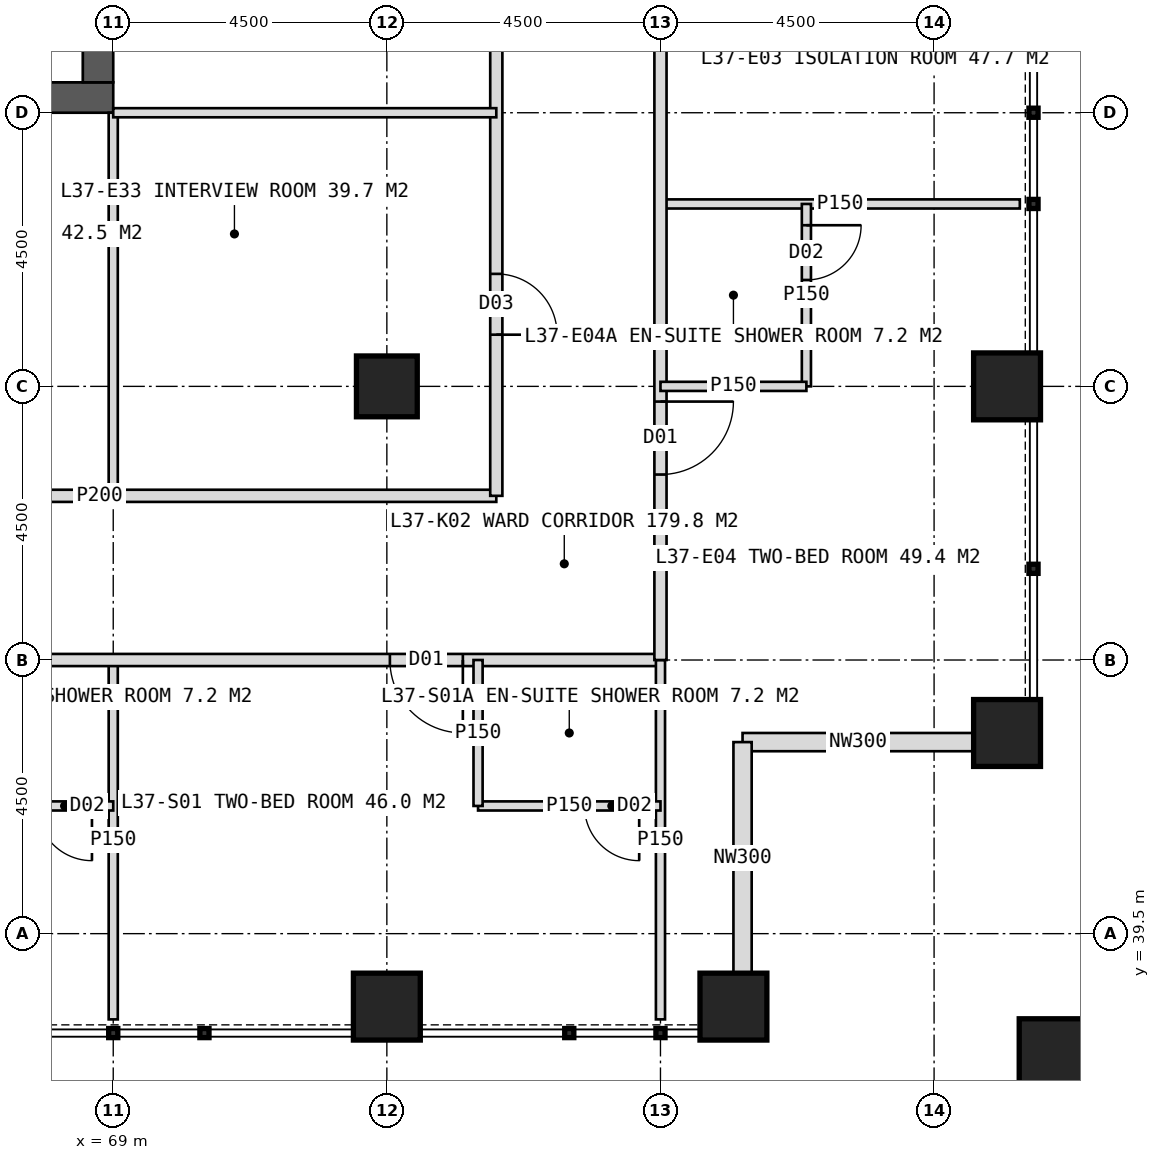
"""IFC4 building model, lengths in metres.
Left out: names, types, materials, properties, quantities, classifications, styles, units other than length and angle.
Written with IfcOpenShell. Run it as: python <this file> out.ifc"""

import sys

from ifc_helpers import new_model, si_unit, direction, frame, frame_2d, origin, origin_2d, place, context, subcontext, project, spatial, rectangle, hollow_rectangle, extrude, element, fill, save


model = new_model("IFC4")
c1 = context("Model", 3, precision=1e-05, world=origin(), true_north=direction((0.0, 1.0)))
c2 = subcontext(c1, "Body", "Model", "MODEL_VIEW")
j1 = project(units=[si_unit("LENGTHUNIT", "METRE"), si_unit("PLANEANGLEUNIT", "RADIAN")], contexts=[c1])
p1 = place(None, origin())
s1 = spatial("IfcSite", under=j1, at=p1, CompositionType="ELEMENT")
p2 = place(p1, origin())
s2 = spatial("IfcBuilding", under=s1, at=p2, CompositionType="ELEMENT")
p3 = place(p2, frame((0.0, 0.0, 156.0)))
s3 = spatial("IfcBuildingStorey", under=s2, at=p3, CompositionType="ELEMENT", Elevation=156.0)
p4 = place(p3, frame((51.0, 53.25, 0.0), z_axis=(0.0, 0.0, 1.0), x_axis=(1.0, 0.0, 0.0)))
e1 = element("IfcWall", 1, at=p4, inside=s3, PredefinedType="SHEAR", context=c2, shape_type="SweptSolid", body=[
    extrude(rectangle(XDim=18.0, YDim=0.5, at=frame_2d((9.0, 0.0))), origin(), (0.0, 0.0, 1.0), 4.0),
])
p5 = place(p4, frame((8.1, 0.0, 0.0)))
e2 = element("IfcOpeningElement", 2, at=p5, cuts=e1, PredefinedType="OPENING", context=c2, shape_type="SweptSolid", body=[
    extrude(rectangle(XDim=1.8, YDim=2.2, at=frame_2d((0.9, 1.1))), frame((0.0, 0.26, 0.0), z_axis=(0.0, -1.0, 0.0), x_axis=(1.0, 0.0, 0.0)), (0.0, 0.0, 1.0), 0.52),
])
p6 = place(p3, frame((68.75, 53.5, 0.0), z_axis=(0.0, 0.0, 1.0), x_axis=(0.0, 1.0, 0.0)))
e3 = element("IfcWall", 3, at=p6, inside=s3, PredefinedType="SHEAR", context=c2, shape_type="SweptSolid", body=[
    extrude(rectangle(XDim=17.0, YDim=0.5, at=frame_2d((8.5, 0.0))), origin(), (0.0, 0.0, 1.0), 4.0),
])
p7 = place(p6, frame((9.5, 0.0, 0.0)))
e4 = element("IfcOpeningElement", 4, at=p7, cuts=e3, PredefinedType="OPENING", context=c2, shape_type="SweptSolid", body=[
    extrude(rectangle(XDim=1.5, YDim=2.2, at=frame_2d((0.75, 1.1))), frame((0.0, 0.26, 0.0), z_axis=(0.0, -1.0, 0.0), x_axis=(1.0, 0.0, 0.0)), (0.0, 0.0, 1.0), 0.52),
])
p8 = place(p3, frame((73.5, 48.5, 0.0), z_axis=(0.0, 0.0, 1.0), x_axis=(1.0, 0.0, 0.0)))
e5 = element("IfcColumn", 5, at=p8, inside=s3, PredefinedType="COLUMN", context=c2, shape_type="SweptSolid", body=[
    extrude(hollow_rectangle(XDim=1.0, YDim=1.0, WallThickness=0.1, at=origin_2d()), origin(), (0.0, 0.0, 1.0), 4.0),
])
for number, where, z_axis, x_axis in (
    (6, (83.7, 42.8, 0.0), (0.0, 0.0, 1.0), (1.0, 0.0, 0.0)),
    (7, (83.7, 48.5, 0.0), (0.0, 0.0, 1.0), (1.0, 0.0, 0.0)),
    (8, (73.5, 38.3, 0.0), (0.0, 0.0, 1.0), (1.0, 0.0, 0.0)),
    (9, (79.2, 38.3, 0.0), (0.0, 0.0, 1.0), (1.0, 0.0, 0.0)),
):
    element("IfcColumn", number, at=place(p3, frame(where, z_axis=z_axis, x_axis=x_axis)), inside=s3, PredefinedType="COLUMN", context=c2, shape_type="SweptSolid", body=[
        extrude(hollow_rectangle(XDim=1.1, YDim=1.1, WallThickness=0.1, at=origin_2d()), origin(), (0.0, 0.0, 1.0), 4.0),
    ])
p9 = place(p3, frame((84.6, 37.4, 0.0), z_axis=(0.0, 0.0, 1.0), x_axis=(1.0, 0.0, 0.0)))
e10 = element("IfcColumn", 10, at=p9, inside=s3, PredefinedType="COLUMN", context=c2, shape_type="SweptSolid", body=[
    extrude(hollow_rectangle(XDim=1.4, YDim=1.4, WallThickness=0.08, at=origin_2d()), origin(), (0.0, 0.0, 1.0), 4.0),
])
for number, where, z_axis, x_axis in (
    (11, (83.15, 42.65, 0.0), (0.0, 0.0, 1.0), (-1.0, 0.0, 0.0)),
    (12, (79.35, 42.65, 0.0), (0.0, 0.0, 1.0), (0.0, -1.0, 0.0)),
):
    element("IfcWall", number, at=place(p3, frame(where, z_axis=z_axis, x_axis=x_axis)), inside=s3, PredefinedType="ELEMENTEDWALL", context=c2, shape_type="SweptSolid", body=[
        extrude(rectangle(XDim=3.8, YDim=0.3, at=frame_2d((1.9, 0.0))), origin(), (0.0, 0.0, 1.0), 4.0),
    ])
p10 = place(p3, frame((69.0, 44.0, 0.0), z_axis=(0.0, 0.0, 1.0), x_axis=(0.0, -1.0, 0.0)))
e13 = element("IfcWall", 13, at=p10, inside=s3, PredefinedType="PARTITIONING", context=c2, shape_type="SweptSolid", body=[
    extrude(rectangle(XDim=5.91, YDim=0.15, at=frame_2d((2.955, 0.0))), origin(), (0.0, 0.0, 1.0), 3.75),
])
p11 = place(p3, frame((78.0, 44.0, 0.0), z_axis=(0.0, 0.0, 1.0), x_axis=(-1.0, 0.0, 0.0)))
e14 = element("IfcWall", 14, at=p11, inside=s3, PredefinedType="PARTITIONING", context=c2, shape_type="SweptSolid", body=[
    extrude(rectangle(XDim=36.0, YDim=0.2, at=frame_2d((18.0, 0.0))), origin(), (0.0, 0.0, 1.0), 3.75),
])
p12 = place(p11, frame((3.25, 0.0, 0.0)))
e15 = element("IfcOpeningElement", 15, at=p12, cuts=e14, PredefinedType="OPENING", context=c2, shape_type="SweptSolid", body=[
    extrude(rectangle(XDim=1.2, YDim=2.2, at=frame_2d((0.6, 1.1))), frame((0.0, 0.11, 0.0), z_axis=(0.0, -1.0, 0.0), x_axis=(1.0, 0.0, 0.0)), (0.0, 0.0, 1.0), 0.22),
])
p13 = place(p11, frame((12.25, 0.0, 0.0)))
e16 = element("IfcOpeningElement", 16, at=p13, cuts=e14, PredefinedType="OPENING", context=c2, shape_type="SweptSolid", body=[
    extrude(rectangle(XDim=1.2, YDim=2.2, at=frame_2d((0.6, 1.1))), frame((0.0, 0.11, 0.0), z_axis=(0.0, -1.0, 0.0), x_axis=(1.0, 0.0, 0.0)), (0.0, 0.0, 1.0), 0.22),
])
p14 = place(p11, frame((21.25, 0.0, 0.0)))
e17 = element("IfcOpeningElement", 17, at=p14, cuts=e14, PredefinedType="OPENING", context=c2, shape_type="SweptSolid", body=[
    extrude(rectangle(XDim=1.2, YDim=2.2, at=frame_2d((0.6, 1.1))), frame((0.0, 0.11, 0.0), z_axis=(0.0, -1.0, 0.0), x_axis=(1.0, 0.0, 0.0)), (0.0, 0.0, 1.0), 0.22),
])
p15 = place(p11, frame((29.65, 0.0, 0.0)))
e18 = element("IfcOpeningElement", 18, at=p15, cuts=e14, PredefinedType="OPENING", context=c2, shape_type="SweptSolid", body=[
    extrude(rectangle(XDim=1.2, YDim=2.2, at=frame_2d((0.6, 1.1))), frame((0.0, 0.11, 0.0), z_axis=(0.0, -1.0, 0.0), x_axis=(1.0, 0.0, 0.0)), (0.0, 0.0, 1.0), 0.22),
])
p16 = place(p3, frame((78.0, 44.0, 0.0), z_axis=(0.0, 0.0, 1.0), x_axis=(0.0, -1.0, 0.0)))
e19 = element("IfcWall", 19, at=p16, inside=s3, PredefinedType="PARTITIONING", context=c2, shape_type="SweptSolid", body=[
    extrude(rectangle(XDim=5.91, YDim=0.15, at=frame_2d((2.955, 0.0))), origin(), (0.0, 0.0, 1.0), 3.75),
])
p17 = place(p3, frame((78.0, 41.6, 0.0), z_axis=(0.0, 0.0, 1.0), x_axis=(-1.0, 0.0, 0.0)))
e20 = element("IfcWall", 20, at=p17, inside=s3, PredefinedType="PARTITIONING", context=c2, shape_type="SweptSolid", body=[
    extrude(rectangle(XDim=3.0, YDim=0.15, at=frame_2d((1.5, 0.0))), origin(), (0.0, 0.0, 1.0), 3.75),
])
p18 = place(p17, frame((0.35, 0.0, 0.0)))
e21 = element("IfcOpeningElement", 21, at=p18, cuts=e20, PredefinedType="OPENING", context=c2, shape_type="SweptSolid", body=[
    extrude(rectangle(XDim=0.9, YDim=2.1, at=frame_2d((0.45, 1.05))), frame((0.0, 0.085, 0.0), z_axis=(0.0, -1.0, 0.0), x_axis=(1.0, 0.0, 0.0)), (0.0, 0.0, 1.0), 0.17),
])
p19 = place(p3, frame((75.0, 44.0, 0.0), z_axis=(0.0, 0.0, 1.0), x_axis=(0.0, -1.0, 0.0)))
e22 = element("IfcWall", 22, at=p19, inside=s3, PredefinedType="PARTITIONING", context=c2, shape_type="SweptSolid", body=[
    extrude(rectangle(XDim=2.4, YDim=0.15, at=frame_2d((1.2, 0.0))), origin(), (0.0, 0.0, 1.0), 3.75),
])
p20 = place(p3, frame((69.0, 41.6, 0.0), z_axis=(0.0, 0.0, 1.0), x_axis=(-1.0, 0.0, 0.0)))
e23 = element("IfcWall", 23, at=p20, inside=s3, PredefinedType="PARTITIONING", context=c2, shape_type="SweptSolid", body=[
    extrude(rectangle(XDim=3.0, YDim=0.15, at=frame_2d((1.5, 0.0))), origin(), (0.0, 0.0, 1.0), 3.75),
])
p21 = place(p20, frame((0.35, 0.0, 0.0)))
e24 = element("IfcOpeningElement", 24, at=p21, cuts=e23, PredefinedType="OPENING", context=c2, shape_type="SweptSolid", body=[
    extrude(rectangle(XDim=0.9, YDim=2.1, at=frame_2d((0.45, 1.05))), frame((0.0, 0.085, 0.0), z_axis=(0.0, -1.0, 0.0), x_axis=(1.0, 0.0, 0.0)), (0.0, 0.0, 1.0), 0.17),
])
p22 = place(p3, frame((69.0, 53.0, 0.0), z_axis=(0.0, 0.0, 1.0), x_axis=(0.0, -1.0, 0.0)))
e25 = element("IfcWall", 25, at=p22, inside=s3, PredefinedType="PARTITIONING", context=c2, shape_type="SweptSolid", body=[
    extrude(rectangle(XDim=6.3, YDim=0.15, at=frame_2d((3.15, 0.0))), origin(), (0.0, 0.0, 1.0), 3.75),
])
p23 = place(p3, frame((75.3, 46.7, 0.0), z_axis=(0.0, 0.0, 1.0), x_axis=(-1.0, 0.0, 0.0)))
e26 = element("IfcWall", 26, at=p23, inside=s3, PredefinedType="PARTITIONING", context=c2, shape_type="SweptSolid", body=[
    extrude(rectangle(XDim=13.05, YDim=0.2, at=frame_2d((6.525, 0.0))), origin(), (0.0, 0.0, 1.0), 3.75),
])
p24 = place(p23, frame((9.175, 0.0, 0.0)))
e27 = element("IfcOpeningElement", 27, at=p24, cuts=e26, PredefinedType="OPENING", context=c2, shape_type="SweptSolid", body=[
    extrude(rectangle(XDim=1.0, YDim=2.1, at=frame_2d((0.5, 1.05))), frame((0.0, 0.11, 0.0), z_axis=(0.0, -1.0, 0.0), x_axis=(1.0, 0.0, 0.0)), (0.0, 0.0, 1.0), 0.22),
])
p25 = place(p3, frame((78.0, 51.5, 0.0), z_axis=(0.0, 0.0, 1.0), x_axis=(1.0, 0.0, 0.0)))
e28 = element("IfcWall", 28, at=p25, inside=s3, PredefinedType="PARTITIONING", context=c2, shape_type="SweptSolid", body=[
    extrude(rectangle(XDim=5.91, YDim=0.15, at=frame_2d((2.955, 0.0))), origin(), (0.0, 0.0, 1.0), 3.75),
])
p26 = place(p3, frame((78.0, 80.0, 0.0), z_axis=(0.0, 0.0, 1.0), x_axis=(0.0, -1.0, 0.0)))
e29 = element("IfcWall", 29, at=p26, inside=s3, PredefinedType="PARTITIONING", context=c2, shape_type="SweptSolid", body=[
    extrude(rectangle(XDim=36.0, YDim=0.2, at=frame_2d((18.0, 0.0))), origin(), (0.0, 0.0, 1.0), 3.75),
])
p27 = place(p26, frame((3.25, 0.0, 0.0)))
e30 = element("IfcOpeningElement", 30, at=p27, cuts=e29, PredefinedType="OPENING", context=c2, shape_type="SweptSolid", body=[
    extrude(rectangle(XDim=1.2, YDim=2.2, at=frame_2d((0.6, 1.1))), frame((0.0, 0.11, 0.0), z_axis=(0.0, -1.0, 0.0), x_axis=(1.0, 0.0, 0.0)), (0.0, 0.0, 1.0), 0.22),
])
p28 = place(p26, frame((10.75, 0.0, 0.0)))
e31 = element("IfcOpeningElement", 31, at=p28, cuts=e29, PredefinedType="OPENING", context=c2, shape_type="SweptSolid", body=[
    extrude(rectangle(XDim=1.2, YDim=2.2, at=frame_2d((0.6, 1.1))), frame((0.0, 0.11, 0.0), z_axis=(0.0, -1.0, 0.0), x_axis=(1.0, 0.0, 0.0)), (0.0, 0.0, 1.0), 0.22),
])
p29 = place(p26, frame((21.25, 0.0, 0.0)))
e32 = element("IfcOpeningElement", 32, at=p29, cuts=e29, PredefinedType="OPENING", context=c2, shape_type="SweptSolid", body=[
    extrude(rectangle(XDim=1.2, YDim=2.2, at=frame_2d((0.6, 1.1))), frame((0.0, 0.11, 0.0), z_axis=(0.0, -1.0, 0.0), x_axis=(1.0, 0.0, 0.0)), (0.0, 0.0, 1.0), 0.22),
])
p30 = place(p26, frame((31.75, 0.0, 0.0)))
e33 = element("IfcOpeningElement", 33, at=p30, cuts=e29, PredefinedType="OPENING", context=c2, shape_type="SweptSolid", body=[
    extrude(rectangle(XDim=1.2, YDim=2.2, at=frame_2d((0.6, 1.1))), frame((0.0, 0.11, 0.0), z_axis=(0.0, -1.0, 0.0), x_axis=(1.0, 0.0, 0.0)), (0.0, 0.0, 1.0), 0.22),
])
p31 = place(p3, frame((80.4, 51.5, 0.0), z_axis=(0.0, 0.0, 1.0), x_axis=(0.0, -1.0, 0.0)))
e34 = element("IfcWall", 34, at=p31, inside=s3, PredefinedType="PARTITIONING", context=c2, shape_type="SweptSolid", body=[
    extrude(rectangle(XDim=3.0, YDim=0.15, at=frame_2d((1.5, 0.0))), origin(), (0.0, 0.0, 1.0), 3.75),
])
p32 = place(p31, frame((0.35, 0.0, 0.0)))
e35 = element("IfcOpeningElement", 35, at=p32, cuts=e34, PredefinedType="OPENING", context=c2, shape_type="SweptSolid", body=[
    extrude(rectangle(XDim=0.9, YDim=2.1, at=frame_2d((0.45, 1.05))), frame((0.0, 0.085, 0.0), z_axis=(0.0, -1.0, 0.0), x_axis=(1.0, 0.0, 0.0)), (0.0, 0.0, 1.0), 0.17),
])
p33 = place(p3, frame((78.0, 48.5, 0.0), z_axis=(0.0, 0.0, 1.0), x_axis=(1.0, 0.0, 0.0)))
e36 = element("IfcWall", 36, at=p33, inside=s3, PredefinedType="PARTITIONING", context=c2, shape_type="SweptSolid", body=[
    extrude(rectangle(XDim=2.4, YDim=0.15, at=frame_2d((1.2, 0.0))), origin(), (0.0, 0.0, 1.0), 2.95),
])
p34 = place(p3, frame((75.3, 62.0, 0.0), z_axis=(0.0, 0.0, 1.0), x_axis=(0.0, -1.0, 0.0)))
e37 = element("IfcWall", 37, at=p34, inside=s3, PredefinedType="PARTITIONING", context=c2, shape_type="SweptSolid", body=[
    extrude(rectangle(XDim=15.3, YDim=0.2, at=frame_2d((7.65, 0.0))), origin(), (0.0, 0.0, 1.0), 3.75),
])
p35 = place(p34, frame((4.0, 0.0, 0.0)))
e38 = element("IfcOpeningElement", 38, at=p35, cuts=e37, PredefinedType="OPENING", context=c2, shape_type="SweptSolid", body=[
    extrude(rectangle(XDim=1.0, YDim=2.1, at=frame_2d((0.5, 1.05))), frame((0.0, 0.11, 0.0), z_axis=(0.0, -1.0, 0.0), x_axis=(1.0, 0.0, 0.0)), (0.0, 0.0, 1.0), 0.22),
])
p36 = place(p34, frame((11.65, 0.0, 0.0)))
e39 = element("IfcOpeningElement", 39, at=p36, cuts=e37, PredefinedType="OPENING", context=c2, shape_type="SweptSolid", body=[
    extrude(rectangle(XDim=1.0, YDim=2.1, at=frame_2d((0.5, 1.05))), frame((0.0, 0.11, 0.0), z_axis=(0.0, -1.0, 0.0), x_axis=(1.0, 0.0, 0.0)), (0.0, 0.0, 1.0), 0.22),
])
p37 = place(p3, frame((69.0, 53.0, 0.0), z_axis=(0.0, 0.0, 1.0), x_axis=(1.0, 0.0, 0.0)))
e40 = element("IfcWall", 40, at=p37, inside=s3, PredefinedType="PARTITIONING", context=c2, shape_type="SweptSolid", body=[
    extrude(rectangle(XDim=6.3, YDim=0.15, at=frame_2d((3.15, 0.0))), origin(), (0.0, 0.0, 1.0), 3.75),
])
p38 = place(p12, origin())
e41 = element("IfcDoor", 41, at=p38, inside=s3, OperationType="SINGLE_SWING_LEFT", PredefinedType="DOOR", context=c2, shape_type="SweptSolid", body=[
    extrude(rectangle(XDim=1.2, YDim=2.2, at=frame_2d((0.6, 1.1))), frame((0.0, 0.025, 0.0), z_axis=(0.0, -1.0, 0.0), x_axis=(1.0, 0.0, 0.0)), (0.0, 0.0, 1.0), 0.05),
])
fill(e15, e41)
p39 = place(p18, origin())
e42 = element("IfcDoor", 42, at=p39, inside=s3, OperationType="SINGLE_SWING_LEFT", PredefinedType="DOOR", context=c2, shape_type="SweptSolid", body=[
    extrude(rectangle(XDim=0.9, YDim=2.1, at=frame_2d((0.45, 1.05))), frame((0.0, 0.025, 0.0), z_axis=(0.0, -1.0, 0.0), x_axis=(1.0, 0.0, 0.0)), (0.0, 0.0, 1.0), 0.05),
])
fill(e21, e42)
p40 = place(p21, origin())
e43 = element("IfcDoor", 43, at=p40, inside=s3, OperationType="SINGLE_SWING_LEFT", PredefinedType="DOOR", context=c2, shape_type="SweptSolid", body=[
    extrude(rectangle(XDim=0.9, YDim=2.1, at=frame_2d((0.45, 1.05))), frame((0.0, 0.025, 0.0), z_axis=(0.0, -1.0, 0.0), x_axis=(1.0, 0.0, 0.0)), (0.0, 0.0, 1.0), 0.05),
])
fill(e24, e43)
p41 = place(p30, origin())
e44 = element("IfcDoor", 44, at=p41, inside=s3, OperationType="SINGLE_SWING_LEFT", PredefinedType="DOOR", context=c2, shape_type="SweptSolid", body=[
    extrude(rectangle(XDim=1.2, YDim=2.2, at=frame_2d((0.6, 1.1))), frame((0.0, 0.025, 0.0), z_axis=(0.0, -1.0, 0.0), x_axis=(1.0, 0.0, 0.0)), (0.0, 0.0, 1.0), 0.05),
])
fill(e33, e44)
p42 = place(p32, origin())
e45 = element("IfcDoor", 45, at=p42, inside=s3, OperationType="SINGLE_SWING_LEFT", PredefinedType="DOOR", context=c2, shape_type="SweptSolid", body=[
    extrude(rectangle(XDim=0.9, YDim=2.1, at=frame_2d((0.45, 1.05))), frame((0.0, 0.025, 0.0), z_axis=(0.0, -1.0, 0.0), x_axis=(1.0, 0.0, 0.0)), (0.0, 0.0, 1.0), 0.05),
])
fill(e35, e45)
p43 = place(p36, origin())
e46 = element("IfcDoor", 46, at=p43, inside=s3, OperationType="SINGLE_SWING_RIGHT", PredefinedType="DOOR", context=c2, shape_type="SweptSolid", body=[
    extrude(rectangle(XDim=1.0, YDim=2.1, at=frame_2d((0.5, 1.05))), frame((0.0, 0.025, 0.0), z_axis=(0.0, -1.0, 0.0), x_axis=(1.0, 0.0, 0.0)), (0.0, 0.0, 1.0), 0.05),
])
fill(e39, e46)
save(model, sys.argv[1])
